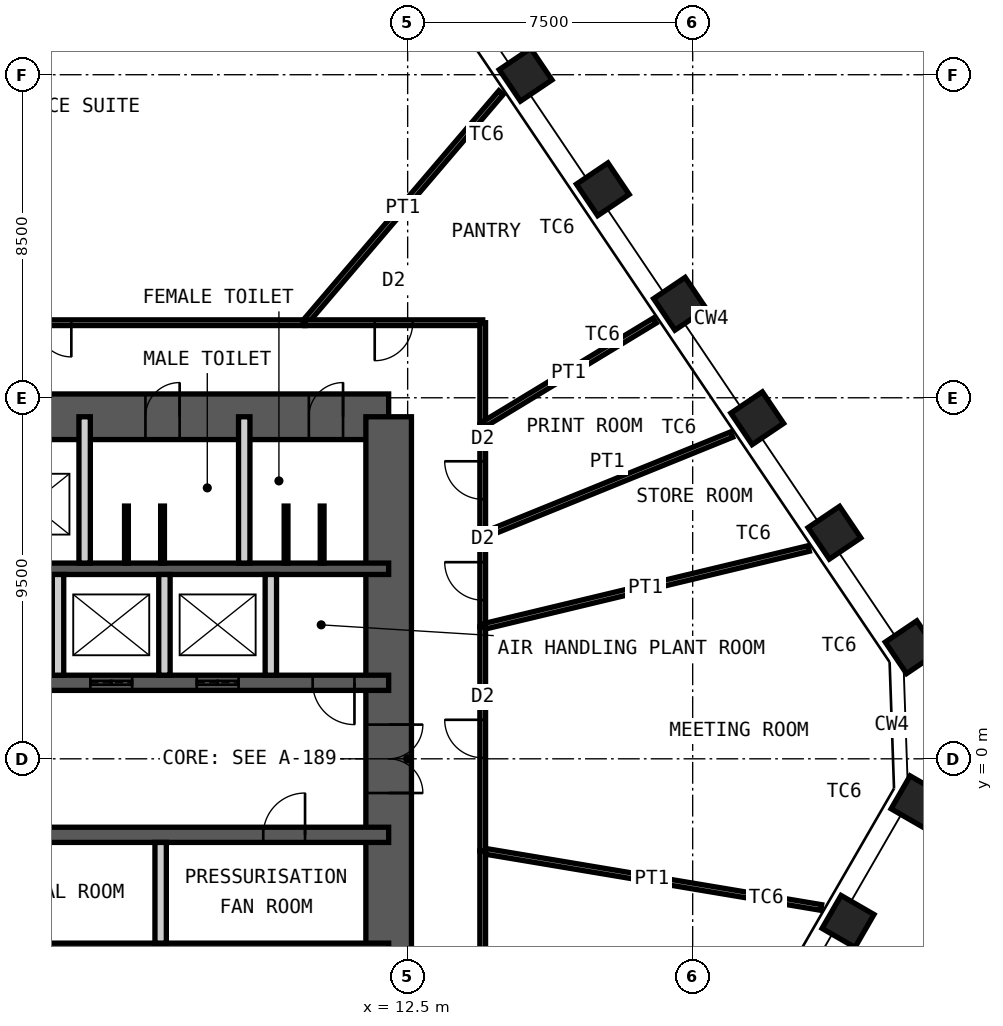
"""IFC4 building model, lengths in metres.
Left out: names, types, materials, properties, quantities, classifications, styles, units other than length and angle.
Written with IfcOpenShell. Run it as: python <this file> out.ifc"""

import sys

from ifc_helpers import new_model, si_unit, direction, frame, frame_2d, origin, origin_2d, place, context, subcontext, project, spatial, rectangle, hollow_rectangle, extrude, element, fill, save


model = new_model("IFC4")
c1 = context("Model", 3, precision=1e-05, world=origin(), true_north=direction((0.0, 1.0)))
c2 = subcontext(c1, "Body", "Model", "MODEL_VIEW")
j1 = project(units=[si_unit("LENGTHUNIT", "METRE"), si_unit("PLANEANGLEUNIT", "RADIAN")], contexts=[c1])
p1 = place(None, origin())
s1 = spatial("IfcSite", under=j1, at=p1, CompositionType="ELEMENT")
p2 = place(p1, origin())
s2 = spatial("IfcBuilding", under=s1, at=p2, CompositionType="ELEMENT")
p3 = place(p2, frame((0.0, 0.0, 247.6)))
s3 = spatial("IfcBuildingStorey", under=s2, at=p3, CompositionType="ELEMENT", Elevation=247.6)
for number, where, z_axis, x_axis in (
    (1, (15.603, 17.998, 0.0), (0.0, 0.0, 1.0), (-0.559, 0.829, 0.0)),
    (2, (17.635, 14.986, 0.0), (0.0, 0.0, 1.0), (-0.559, 0.829, 0.0)),
    (3, (19.667, 11.973, 0.0), (0.0, 0.0, 1.0), (-0.559, 0.829, 0.0)),
    (4, (21.699, 8.961, 0.0), (0.0, 0.0, 1.0), (-0.559, 0.829, 0.0)),
    (5, (23.731, 5.948, 0.0), (0.0, 0.0, 1.0), (-0.559, 0.829, 0.0)),
    (6, (25.762, 2.936, 0.0), (0.0, 0.0, 1.0), (-0.559, 0.829, 0.0)),
    (7, (25.905, -1.132, 0.0), (0.0, 0.0, 1.0), (0.5, 0.866, 0.0)),
    (8, (24.088, -4.279, 0.0), (0.0, 0.0, 1.0), (0.5, 0.866, 0.0)),
):
    element("IfcColumn", number, at=place(p3, frame(where, z_axis=z_axis, x_axis=x_axis)), inside=s3, PredefinedType="COLUMN", context=c2, shape_type="SweptSolid", body=[
        extrude(hollow_rectangle(XDim=1.0, YDim=1.0, WallThickness=0.06, at=origin_2d()), origin(), (0.0, 0.0, 1.0), 4.2),
    ])
p4 = place(p3, frame((-12.0, 9.0, 0.0), z_axis=(0.0, 0.0, 1.0), x_axis=(1.0, 0.0, 0.0)))
e9 = element("IfcWall", 9, at=p4, inside=s3, PredefinedType="SHEAR", context=c2, shape_type="SweptSolid", body=[
    extrude(rectangle(XDim=24.0, YDim=1.2, at=frame_2d((12.0, 0.0))), origin(), (0.0, 0.0, 1.0), 4.2),
])
p5 = place(p4, frame((10.4, 0.0, 0.0)))
e10 = element("IfcOpeningElement", 10, at=p5, cuts=e9, PredefinedType="OPENING", context=c2, shape_type="SweptSolid", body=[
    extrude(rectangle(XDim=1.0, YDim=2.1, at=frame_2d((0.5, 1.05))), frame((0.0, 0.61, 0.0), z_axis=(0.0, -1.0, 0.0), x_axis=(1.0, 0.0, 0.0)), (0.0, 0.0, 1.0), 1.22),
])
p6 = place(p4, frame((17.6, 0.0, 0.0)))
e11 = element("IfcOpeningElement", 11, at=p6, cuts=e9, PredefinedType="OPENING", context=c2, shape_type="SweptSolid", body=[
    extrude(rectangle(XDim=0.9, YDim=2.1, at=frame_2d((0.45, 1.05))), frame((0.0, 0.61, 0.0), z_axis=(0.0, -1.0, 0.0), x_axis=(1.0, 0.0, 0.0)), (0.0, 0.0, 1.0), 1.22),
])
p7 = place(p4, frame((21.9, 0.0, 0.0)))
e12 = element("IfcOpeningElement", 12, at=p7, cuts=e9, PredefinedType="OPENING", context=c2, shape_type="SweptSolid", body=[
    extrude(rectangle(XDim=0.9, YDim=2.1, at=frame_2d((0.45, 1.05))), frame((0.0, 0.61, 0.0), z_axis=(0.0, -1.0, 0.0), x_axis=(1.0, 0.0, 0.0)), (0.0, 0.0, 1.0), 1.22),
])
p8 = place(p3, frame((12.0, -9.0, 0.0), z_axis=(0.0, 0.0, 1.0), x_axis=(0.0, 1.0, 0.0)))
e13 = element("IfcWall", 13, at=p8, inside=s3, PredefinedType="SHEAR", context=c2, shape_type="SweptSolid", body=[
    extrude(rectangle(XDim=18.0, YDim=1.2, at=frame_2d((9.0, 0.0))), origin(), (0.0, 0.0, 1.0), 4.2),
])
p9 = place(p8, frame((8.1, 0.0, 0.0)))
e14 = element("IfcOpeningElement", 14, at=p9, cuts=e13, PredefinedType="OPENING", context=c2, shape_type="SweptSolid", body=[
    extrude(rectangle(XDim=1.8, YDim=2.1, at=frame_2d((0.9, 1.05))), frame((0.0, 0.61, 0.0), z_axis=(0.0, -1.0, 0.0), x_axis=(1.0, 0.0, 0.0)), (0.0, 0.0, 1.0), 1.22),
])
p10 = place(p3, frame((-12.0, 5.0, 0.0), z_axis=(0.0, 0.0, 1.0), x_axis=(1.0, 0.0, 0.0)))
e15 = element("IfcWall", 15, at=p10, inside=s3, PredefinedType="SHEAR", context=c2, shape_type="SweptSolid", body=[
    extrude(rectangle(XDim=24.0, YDim=0.3, at=frame_2d((12.0, 0.0))), origin(), (0.0, 0.0, 1.0), 4.2),
])
p11 = place(p3, frame((-12.0, 2.0, 0.0), z_axis=(0.0, 0.0, 1.0), x_axis=(1.0, 0.0, 0.0)))
e16 = element("IfcWall", 16, at=p11, inside=s3, PredefinedType="SHEAR", context=c2, shape_type="SweptSolid", body=[
    extrude(rectangle(XDim=24.0, YDim=0.4, at=frame_2d((12.0, 0.0))), origin(), (0.0, 0.0, 1.0), 4.2),
])
p12 = place(p11, frame((2.4, 0.0, 0.0)))
e17 = element("IfcOpeningElement", 17, at=p12, cuts=e16, PredefinedType="OPENING", context=c2, shape_type="SweptSolid", body=[
    extrude(rectangle(XDim=1.1, YDim=2.1, at=frame_2d((0.55, 1.05))), frame((0.0, 0.21, 0.0), z_axis=(0.0, -1.0, 0.0), x_axis=(1.0, 0.0, 0.0)), (0.0, 0.0, 1.0), 0.42),
])
p13 = place(p11, frame((22.0, 0.0, 0.0)))
e18 = element("IfcOpeningElement", 18, at=p13, cuts=e16, PredefinedType="OPENING", context=c2, shape_type="SweptSolid", body=[
    extrude(rectangle(XDim=1.1, YDim=2.1, at=frame_2d((0.55, 1.05))), frame((0.0, 0.21, 0.0), z_axis=(0.0, -1.0, 0.0), x_axis=(1.0, 0.0, 0.0)), (0.0, 0.0, 1.0), 0.42),
])
p14 = place(p11, frame((10.15, 0.0, 0.0)))
e19 = element("IfcOpeningElement", 19, at=p14, cuts=e16, PredefinedType="OPENING", context=c2, shape_type="SweptSolid", body=[
    extrude(rectangle(XDim=1.0, YDim=2.1, at=frame_2d((0.5, 1.05))), frame((0.0, 0.21, 0.0), z_axis=(0.0, -1.0, 0.0), x_axis=(1.0, 0.0, 0.0)), (0.0, 0.0, 1.0), 0.42),
])
p15 = place(p11, frame((6.9, 0.0, 0.0)))
e20 = element("IfcOpeningElement", 20, at=p15, cuts=e16, PredefinedType="OPENING", context=c2, shape_type="SweptSolid", body=[
    extrude(rectangle(XDim=1.0, YDim=2.1, at=frame_2d((0.5, 1.05))), frame((0.0, 0.21, 0.0), z_axis=(0.0, -1.0, 0.0), x_axis=(1.0, 0.0, 0.0)), (0.0, 0.0, 1.0), 0.42),
])
p16 = place(p11, frame((13.35, 0.0, 0.0)))
e21 = element("IfcOpeningElement", 21, at=p16, cuts=e16, PredefinedType="OPENING", context=c2, shape_type="SweptSolid", body=[
    extrude(rectangle(XDim=1.1, YDim=2.4, at=frame_2d((0.55, 1.2))), frame((0.0, 0.21, 0.0), z_axis=(0.0, -1.0, 0.0), x_axis=(1.0, 0.0, 0.0)), (0.0, 0.0, 1.0), 0.42),
])
p17 = place(p11, frame((16.15, 0.0, 0.0)))
e22 = element("IfcOpeningElement", 22, at=p17, cuts=e16, PredefinedType="OPENING", context=c2, shape_type="SweptSolid", body=[
    extrude(rectangle(XDim=1.1, YDim=2.4, at=frame_2d((0.55, 1.2))), frame((0.0, 0.21, 0.0), z_axis=(0.0, -1.0, 0.0), x_axis=(1.0, 0.0, 0.0)), (0.0, 0.0, 1.0), 0.42),
])
p18 = place(p11, frame((18.95, 0.0, 0.0)))
e23 = element("IfcOpeningElement", 23, at=p18, cuts=e16, PredefinedType="OPENING", context=c2, shape_type="SweptSolid", body=[
    extrude(rectangle(XDim=1.1, YDim=2.4, at=frame_2d((0.55, 1.2))), frame((0.0, 0.21, 0.0), z_axis=(0.0, -1.0, 0.0), x_axis=(1.0, 0.0, 0.0)), (0.0, 0.0, 1.0), 0.42),
])
p19 = place(p3, frame((-12.0, -2.0, 0.0), z_axis=(0.0, 0.0, 1.0), x_axis=(1.0, 0.0, 0.0)))
e24 = element("IfcWall", 24, at=p19, inside=s3, PredefinedType="SHEAR", context=c2, shape_type="SweptSolid", body=[
    extrude(rectangle(XDim=24.0, YDim=0.4, at=frame_2d((12.0, 0.0))), origin(), (0.0, 0.0, 1.0), 4.2),
])
p20 = place(p19, frame((1.1, 0.0, 0.0)))
e25 = element("IfcOpeningElement", 25, at=p20, cuts=e24, PredefinedType="OPENING", context=c2, shape_type="SweptSolid", body=[
    extrude(rectangle(XDim=1.1, YDim=2.1, at=frame_2d((0.55, 1.05))), frame((0.0, 0.21, 0.0), z_axis=(0.0, -1.0, 0.0), x_axis=(1.0, 0.0, 0.0)), (0.0, 0.0, 1.0), 0.42),
])
p21 = place(p19, frame((13.55, 0.0, 0.0)))
e26 = element("IfcOpeningElement", 26, at=p21, cuts=e24, PredefinedType="OPENING", context=c2, shape_type="SweptSolid", body=[
    extrude(rectangle(XDim=1.1, YDim=2.1, at=frame_2d((0.55, 1.05))), frame((0.0, 0.21, 0.0), z_axis=(0.0, -1.0, 0.0), x_axis=(1.0, 0.0, 0.0)), (0.0, 0.0, 1.0), 0.42),
])
p22 = place(p19, frame((20.7, 0.0, 0.0)))
e27 = element("IfcOpeningElement", 27, at=p22, cuts=e24, PredefinedType="OPENING", context=c2, shape_type="SweptSolid", body=[
    extrude(rectangle(XDim=1.1, YDim=2.1, at=frame_2d((0.55, 1.05))), frame((0.0, 0.21, 0.0), z_axis=(0.0, -1.0, 0.0), x_axis=(1.0, 0.0, 0.0)), (0.0, 0.0, 1.0), 0.42),
])
p23 = place(p19, frame((4.0, 0.0, 0.0)))
e28 = element("IfcOpeningElement", 28, at=p23, cuts=e24, PredefinedType="OPENING", context=c2, shape_type="SweptSolid", body=[
    extrude(rectangle(XDim=1.0, YDim=2.1, at=frame_2d((0.5, 1.05))), frame((0.0, 0.21, 0.0), z_axis=(0.0, -1.0, 0.0), x_axis=(1.0, 0.0, 0.0)), (0.0, 0.0, 1.0), 0.42),
])
p24 = place(p19, frame((6.8, 0.0, 0.0)))
e29 = element("IfcOpeningElement", 29, at=p24, cuts=e24, PredefinedType="OPENING", context=c2, shape_type="SweptSolid", body=[
    extrude(rectangle(XDim=1.0, YDim=2.1, at=frame_2d((0.5, 1.05))), frame((0.0, 0.21, 0.0), z_axis=(0.0, -1.0, 0.0), x_axis=(1.0, 0.0, 0.0)), (0.0, 0.0, 1.0), 0.42),
])
p25 = place(p3, frame((-12.0, -5.0, 0.0), z_axis=(0.0, 0.0, 1.0), x_axis=(1.0, 0.0, 0.0)))
e30 = element("IfcWall", 30, at=p25, inside=s3, PredefinedType="SHEAR", context=c2, shape_type="SweptSolid", body=[
    extrude(rectangle(XDim=24.0, YDim=0.3, at=frame_2d((12.0, 0.0))), origin(), (0.0, 0.0, 1.0), 4.2),
])
for number, where, z_axis, x_axis in (
    (31, (4.0, 5.15, 0.0), (0.0, 0.0, 1.0), (0.0, 1.0, 0.0)),
    (32, (8.2, 5.15, 0.0), (0.0, 0.0, 1.0), (0.0, 1.0, 0.0)),
):
    element("IfcWall", number, at=place(p3, frame(where, z_axis=z_axis, x_axis=x_axis)), inside=s3, PredefinedType="PARTITIONING", context=c2, shape_type="SweptSolid", body=[
        extrude(rectangle(XDim=3.85, YDim=0.3, at=frame_2d((1.925, 0.0))), origin(), (0.0, 0.0, 1.0), 3.98),
    ])
for number, where, z_axis, x_axis in (
    (33, (3.3, 2.2, 0.0), (0.0, 0.0, 1.0), (0.0, 1.0, 0.0)),
    (34, (6.1, 2.2, 0.0), (0.0, 0.0, 1.0), (0.0, 1.0, 0.0)),
    (35, (8.9, 2.2, 0.0), (0.0, 0.0, 1.0), (0.0, 1.0, 0.0)),
    (36, (6.0, -4.85, 0.0), (0.0, 0.0, 1.0), (0.0, 1.0, 0.0)),
):
    element("IfcWall", number, at=place(p3, frame(where, z_axis=z_axis, x_axis=x_axis)), inside=s3, PredefinedType="PARTITIONING", context=c2, shape_type="SweptSolid", body=[
        extrude(rectangle(XDim=2.65, YDim=0.3, at=frame_2d((1.325, 0.0))), origin(), (0.0, 0.0, 1.0), 3.98),
    ])
for number, where, z_axis, x_axis in (
    (37, (5.1, 5.15, 0.0), (0.0, 0.0, 1.0), (0.0, 1.0, 0.0)),
    (38, (6.05, 5.15, 0.0), (0.0, 0.0, 1.0), (0.0, 1.0, 0.0)),
    (39, (9.3, 5.15, 0.0), (0.0, 0.0, 1.0), (0.0, 1.0, 0.0)),
    (40, (10.25, 5.15, 0.0), (0.0, 0.0, 1.0), (0.0, 1.0, 0.0)),
):
    element("IfcWall", number, at=place(p3, frame(where, z_axis=z_axis, x_axis=x_axis)), inside=s3, PredefinedType="PARTITIONING", context=c2, shape_type="SweptSolid", body=[
        extrude(rectangle(XDim=1.5, YDim=0.1, at=frame_2d((0.75, 0.0))), origin(), (0.0, 0.0, 1.0), 2.1),
    ])
p26 = place(p3, frame((23.383, -3.912, 0.0), z_axis=(0.0, 0.0, 1.0), x_axis=(-0.986293651891, 0.164999491631, 0.0)))
e41 = element("IfcWall", 41, at=p26, inside=s3, PredefinedType="PARTITIONING", context=c2, shape_type="SweptSolid", body=[
    extrude(rectangle(XDim=9.032, YDim=0.15, at=frame_2d((4.516, 0.0))), origin(), (0.0, 0.0, 1.0), 2.93),
])
p27 = place(p3, frame((14.475, -2.422, 0.0), z_axis=(0.0, 0.0, 1.0), x_axis=(0.0, -1.0, 0.0)))
e42 = element("IfcWall", 42, at=p27, inside=s3, PredefinedType="PARTITIONING", context=c2, shape_type="SweptSolid", body=[
    extrude(rectangle(XDim=9.053, YDim=0.15, at=frame_2d((4.527, 0.0))), origin(), (0.0, 0.0, 1.0), 4.03),
])
p28 = place(p3, frame((-4.291, 11.475, 0.0), z_axis=(0.0, 0.0, 1.0), x_axis=(1.0, 0.0, 0.0)))
e43 = element("IfcWall", 43, at=p28, inside=s3, PredefinedType="PARTITIONING", context=c2, shape_type="SweptSolid", body=[
    extrude(rectangle(XDim=14.082, YDim=0.15, at=frame_2d((7.041, 0.0))), origin(), (0.0, 0.0, 1.0), 4.03),
])
p29 = place(p28, frame((6.141, 0.0, 0.0)))
e44 = element("IfcOpeningElement", 44, at=p29, cuts=e43, PredefinedType="OPENING", context=c2, shape_type="SweptSolid", body=[
    extrude(rectangle(XDim=1.8, YDim=2.4, at=frame_2d((0.9, 1.2))), frame((0.0, 0.085, 0.0), z_axis=(0.0, -1.0, 0.0), x_axis=(1.0, 0.0, 0.0)), (0.0, 0.0, 1.0), 0.17),
])
p30 = place(p3, frame((14.958, 17.531, 0.0), z_axis=(0.0, 0.0, 1.0), x_axis=(-0.649097500837, -0.760705221756, 0.0)))
e45 = element("IfcWall", 45, at=p30, inside=s3, PredefinedType="PARTITIONING", context=c2, shape_type="SweptSolid", body=[
    extrude(rectangle(XDim=7.96, YDim=0.15, at=frame_2d((3.98, 0.0))), origin(), (0.0, 0.0, 1.0), 2.93),
])
p31 = place(p3, frame((9.791, 11.475, 0.0), z_axis=(0.0, 0.0, 1.0), x_axis=(1.0, 0.0, 0.0)))
e46 = element("IfcWall", 46, at=p31, inside=s3, PredefinedType="PARTITIONING", context=c2, shape_type="SweptSolid", body=[
    extrude(rectangle(XDim=4.684, YDim=0.15, at=frame_2d((2.342, 0.0))), origin(), (0.0, 0.0, 1.0), 4.03),
])
p32 = place(p31, frame((1.842, 0.0, 0.0)))
e47 = element("IfcOpeningElement", 47, at=p32, cuts=e46, PredefinedType="OPENING", context=c2, shape_type="SweptSolid", body=[
    extrude(rectangle(XDim=1.0, YDim=2.4, at=frame_2d((0.5, 1.2))), frame((0.0, 0.085, 0.0), z_axis=(0.0, -1.0, 0.0), x_axis=(1.0, 0.0, 0.0)), (0.0, 0.0, 1.0), 0.17),
])
p33 = place(p3, frame((14.475, 11.475, 0.0), z_axis=(0.0, 0.0, 1.0), x_axis=(0.0, -1.0, 0.0)))
e48 = element("IfcWall", 48, at=p33, inside=s3, PredefinedType="PARTITIONING", context=c2, shape_type="SweptSolid", body=[
    extrude(rectangle(XDim=2.692, YDim=0.15, at=frame_2d((1.346, 0.0))), origin(), (0.0, 0.0, 1.0), 4.03),
])
p34 = place(p3, frame((19.001, 11.53, 0.0), z_axis=(0.0, 0.0, 1.0), x_axis=(-0.854906581035, -0.518781975114, 0.0)))
e49 = element("IfcWall", 49, at=p34, inside=s3, PredefinedType="PARTITIONING", context=c2, shape_type="SweptSolid", body=[
    extrude(rectangle(XDim=5.294, YDim=0.15, at=frame_2d((2.647, 0.0))), origin(), (0.0, 0.0, 1.0), 2.93),
])
p35 = place(p3, frame((14.475, 8.783, 0.0), z_axis=(0.0, 0.0, 1.0), x_axis=(0.0, -1.0, 0.0)))
e50 = element("IfcWall", 50, at=p35, inside=s3, PredefinedType="PARTITIONING", context=c2, shape_type="SweptSolid", body=[
    extrude(rectangle(XDim=2.91, YDim=0.15, at=frame_2d((1.455, 0.0))), origin(), (0.0, 0.0, 1.0), 4.03),
])
p36 = place(p35, frame((0.955, 0.0, 0.0)))
e51 = element("IfcOpeningElement", 51, at=p36, cuts=e50, PredefinedType="OPENING", context=c2, shape_type="SweptSolid", body=[
    extrude(rectangle(XDim=1.0, YDim=2.4, at=frame_2d((0.5, 1.2))), frame((0.0, 0.085, 0.0), z_axis=(0.0, -1.0, 0.0), x_axis=(1.0, 0.0, 0.0)), (0.0, 0.0, 1.0), 0.17),
])
p37 = place(p3, frame((21.026, 8.532, 0.0), z_axis=(0.0, 0.0, 1.0), x_axis=(-0.926617028548, -0.376006492503, 0.0)))
e52 = element("IfcWall", 52, at=p37, inside=s3, PredefinedType="PARTITIONING", context=c2, shape_type="SweptSolid", body=[
    extrude(rectangle(XDim=7.07, YDim=0.15, at=frame_2d((3.535, 0.0))), origin(), (0.0, 0.0, 1.0), 2.93),
])
p38 = place(p3, frame((14.475, 5.874, 0.0), z_axis=(0.0, 0.0, 1.0), x_axis=(0.0, -1.0, 0.0)))
e53 = element("IfcWall", 53, at=p38, inside=s3, PredefinedType="PARTITIONING", context=c2, shape_type="SweptSolid", body=[
    extrude(rectangle(XDim=2.399, YDim=0.15, at=frame_2d((1.2, 0.0))), origin(), (0.0, 0.0, 1.0), 4.03),
])
p39 = place(p38, frame((0.699, 0.0, 0.0)))
e54 = element("IfcOpeningElement", 54, at=p39, cuts=e53, PredefinedType="OPENING", context=c2, shape_type="SweptSolid", body=[
    extrude(rectangle(XDim=1.0, YDim=2.4, at=frame_2d((0.5, 1.2))), frame((0.0, 0.085, 0.0), z_axis=(0.0, -1.0, 0.0), x_axis=(1.0, 0.0, 0.0)), (0.0, 0.0, 1.0), 0.17),
])
p40 = place(p3, frame((23.053, 5.534, 0.0), z_axis=(0.0, 0.0, 1.0), x_axis=(-0.972377252501, -0.233414821335, 0.0)))
e55 = element("IfcWall", 55, at=p40, inside=s3, PredefinedType="PARTITIONING", context=c2, shape_type="SweptSolid", body=[
    extrude(rectangle(XDim=8.822, YDim=0.15, at=frame_2d((4.411, 0.0))), origin(), (0.0, 0.0, 1.0), 2.93),
])
p41 = place(p3, frame((14.475, 3.475, 0.0), z_axis=(0.0, 0.0, 1.0), x_axis=(0.0, -1.0, 0.0)))
e56 = element("IfcWall", 56, at=p41, inside=s3, PredefinedType="PARTITIONING", context=c2, shape_type="SweptSolid", body=[
    extrude(rectangle(XDim=5.896, YDim=0.15, at=frame_2d((2.948, 0.0))), origin(), (0.0, 0.0, 1.0), 4.03),
])
p42 = place(p41, frame((2.448, 0.0, 0.0)))
e57 = element("IfcOpeningElement", 57, at=p42, cuts=e56, PredefinedType="OPENING", context=c2, shape_type="SweptSolid", body=[
    extrude(rectangle(XDim=1.0, YDim=2.4, at=frame_2d((0.5, 1.2))), frame((0.0, 0.085, 0.0), z_axis=(0.0, -1.0, 0.0), x_axis=(1.0, 0.0, 0.0)), (0.0, 0.0, 1.0), 0.17),
])
p43 = place(p6, origin())
e58 = element("IfcDoor", 58, at=p43, inside=s3, OperationType="SINGLE_SWING_LEFT", PredefinedType="DOOR", context=c2, shape_type="SweptSolid", body=[
    extrude(rectangle(XDim=0.9, YDim=2.1, at=frame_2d((0.45, 1.05))), frame((0.0, 0.025, 0.0), z_axis=(0.0, -1.0, 0.0), x_axis=(1.0, 0.0, 0.0)), (0.0, 0.0, 1.0), 0.05),
])
fill(e11, e58)
p44 = place(p7, origin())
e59 = element("IfcDoor", 59, at=p44, inside=s3, OperationType="SINGLE_SWING_LEFT", PredefinedType="DOOR", context=c2, shape_type="SweptSolid", body=[
    extrude(rectangle(XDim=0.9, YDim=2.1, at=frame_2d((0.45, 1.05))), frame((0.0, 0.025, 0.0), z_axis=(0.0, -1.0, 0.0), x_axis=(1.0, 0.0, 0.0)), (0.0, 0.0, 1.0), 0.05),
])
fill(e12, e59)
p45 = place(p13, origin())
e60 = element("IfcDoor", 60, at=p45, inside=s3, OperationType="SINGLE_SWING_RIGHT", PredefinedType="DOOR", context=c2, shape_type="SweptSolid", body=[
    extrude(rectangle(XDim=1.1, YDim=2.1, at=frame_2d((0.55, 1.05))), frame((0.0, 0.025, 0.0), z_axis=(0.0, -1.0, 0.0), x_axis=(1.0, 0.0, 0.0)), (0.0, 0.0, 1.0), 0.05),
])
fill(e18, e60)
p46 = place(p22, origin())
e61 = element("IfcDoor", 61, at=p46, inside=s3, OperationType="SINGLE_SWING_LEFT", PredefinedType="DOOR", context=c2, shape_type="SweptSolid", body=[
    extrude(rectangle(XDim=1.1, YDim=2.1, at=frame_2d((0.55, 1.05))), frame((0.0, 0.025, 0.0), z_axis=(0.0, -1.0, 0.0), x_axis=(1.0, 0.0, 0.0)), (0.0, 0.0, 1.0), 0.05),
])
fill(e27, e61)
p47 = place(p9, origin())
e62 = element("IfcDoor", 62, at=p47, inside=s3, OperationType="DOUBLE_DOOR_DOUBLE_SWING", PredefinedType="DOOR", context=c2, shape_type="SweptSolid", body=[
    extrude(rectangle(XDim=1.8, YDim=2.1, at=frame_2d((0.9, 1.05))), frame((0.0, 0.025, 0.0), z_axis=(0.0, -1.0, 0.0), x_axis=(1.0, 0.0, 0.0)), (0.0, 0.0, 1.0), 0.05),
])
fill(e14, e62)
p48 = place(p17, origin())
e63 = element("IfcDoor", 63, at=p48, inside=s3, OperationType="DOUBLE_DOOR_SLIDING", PredefinedType="DOOR", context=c2, shape_type="SweptSolid", body=[
    extrude(rectangle(XDim=1.1, YDim=2.4, at=frame_2d((0.55, 1.2))), frame((0.0, 0.025, 0.0), z_axis=(0.0, -1.0, 0.0), x_axis=(1.0, 0.0, 0.0)), (0.0, 0.0, 1.0), 0.05),
])
fill(e22, e63)
p49 = place(p18, origin())
e64 = element("IfcDoor", 64, at=p49, inside=s3, OperationType="DOUBLE_DOOR_SLIDING", PredefinedType="DOOR", context=c2, shape_type="SweptSolid", body=[
    extrude(rectangle(XDim=1.1, YDim=2.4, at=frame_2d((0.55, 1.2))), frame((0.0, 0.025, 0.0), z_axis=(0.0, -1.0, 0.0), x_axis=(1.0, 0.0, 0.0)), (0.0, 0.0, 1.0), 0.05),
])
fill(e23, e64)
p50 = place(p29, origin())
e65 = element("IfcDoor", 65, at=p50, inside=s3, OperationType="DOUBLE_DOOR_DOUBLE_SWING", PredefinedType="DOOR", context=c2, shape_type="SweptSolid", body=[
    extrude(rectangle(XDim=1.8, YDim=2.4, at=frame_2d((0.9, 1.2))), frame((0.0, 0.025, 0.0), z_axis=(0.0, -1.0, 0.0), x_axis=(1.0, 0.0, 0.0)), (0.0, 0.0, 1.0), 0.05),
])
fill(e44, e65)
p51 = place(p32, origin())
e66 = element("IfcDoor", 66, at=p51, inside=s3, OperationType="SINGLE_SWING_LEFT", PredefinedType="DOOR", context=c2, shape_type="SweptSolid", body=[
    extrude(rectangle(XDim=1.0, YDim=2.4, at=frame_2d((0.5, 1.2))), frame((0.0, 0.025, 0.0), z_axis=(0.0, -1.0, 0.0), x_axis=(1.0, 0.0, 0.0)), (0.0, 0.0, 1.0), 0.05),
])
fill(e47, e66)
p52 = place(p36, origin())
e67 = element("IfcDoor", 67, at=p52, inside=s3, OperationType="SINGLE_SWING_LEFT", PredefinedType="DOOR", context=c2, shape_type="SweptSolid", body=[
    extrude(rectangle(XDim=1.0, YDim=2.4, at=frame_2d((0.5, 1.2))), frame((0.0, 0.025, 0.0), z_axis=(0.0, -1.0, 0.0), x_axis=(1.0, 0.0, 0.0)), (0.0, 0.0, 1.0), 0.05),
])
fill(e51, e67)
p53 = place(p39, origin())
e68 = element("IfcDoor", 68, at=p53, inside=s3, OperationType="SINGLE_SWING_LEFT", PredefinedType="DOOR", context=c2, shape_type="SweptSolid", body=[
    extrude(rectangle(XDim=1.0, YDim=2.4, at=frame_2d((0.5, 1.2))), frame((0.0, 0.025, 0.0), z_axis=(0.0, -1.0, 0.0), x_axis=(1.0, 0.0, 0.0)), (0.0, 0.0, 1.0), 0.05),
])
fill(e54, e68)
p54 = place(p42, origin())
e69 = element("IfcDoor", 69, at=p54, inside=s3, OperationType="SINGLE_SWING_LEFT", PredefinedType="DOOR", context=c2, shape_type="SweptSolid", body=[
    extrude(rectangle(XDim=1.0, YDim=2.4, at=frame_2d((0.5, 1.2))), frame((0.0, 0.025, 0.0), z_axis=(0.0, -1.0, 0.0), x_axis=(1.0, 0.0, 0.0)), (0.0, 0.0, 1.0), 0.05),
])
fill(e57, e69)
save(model, sys.argv[1])
